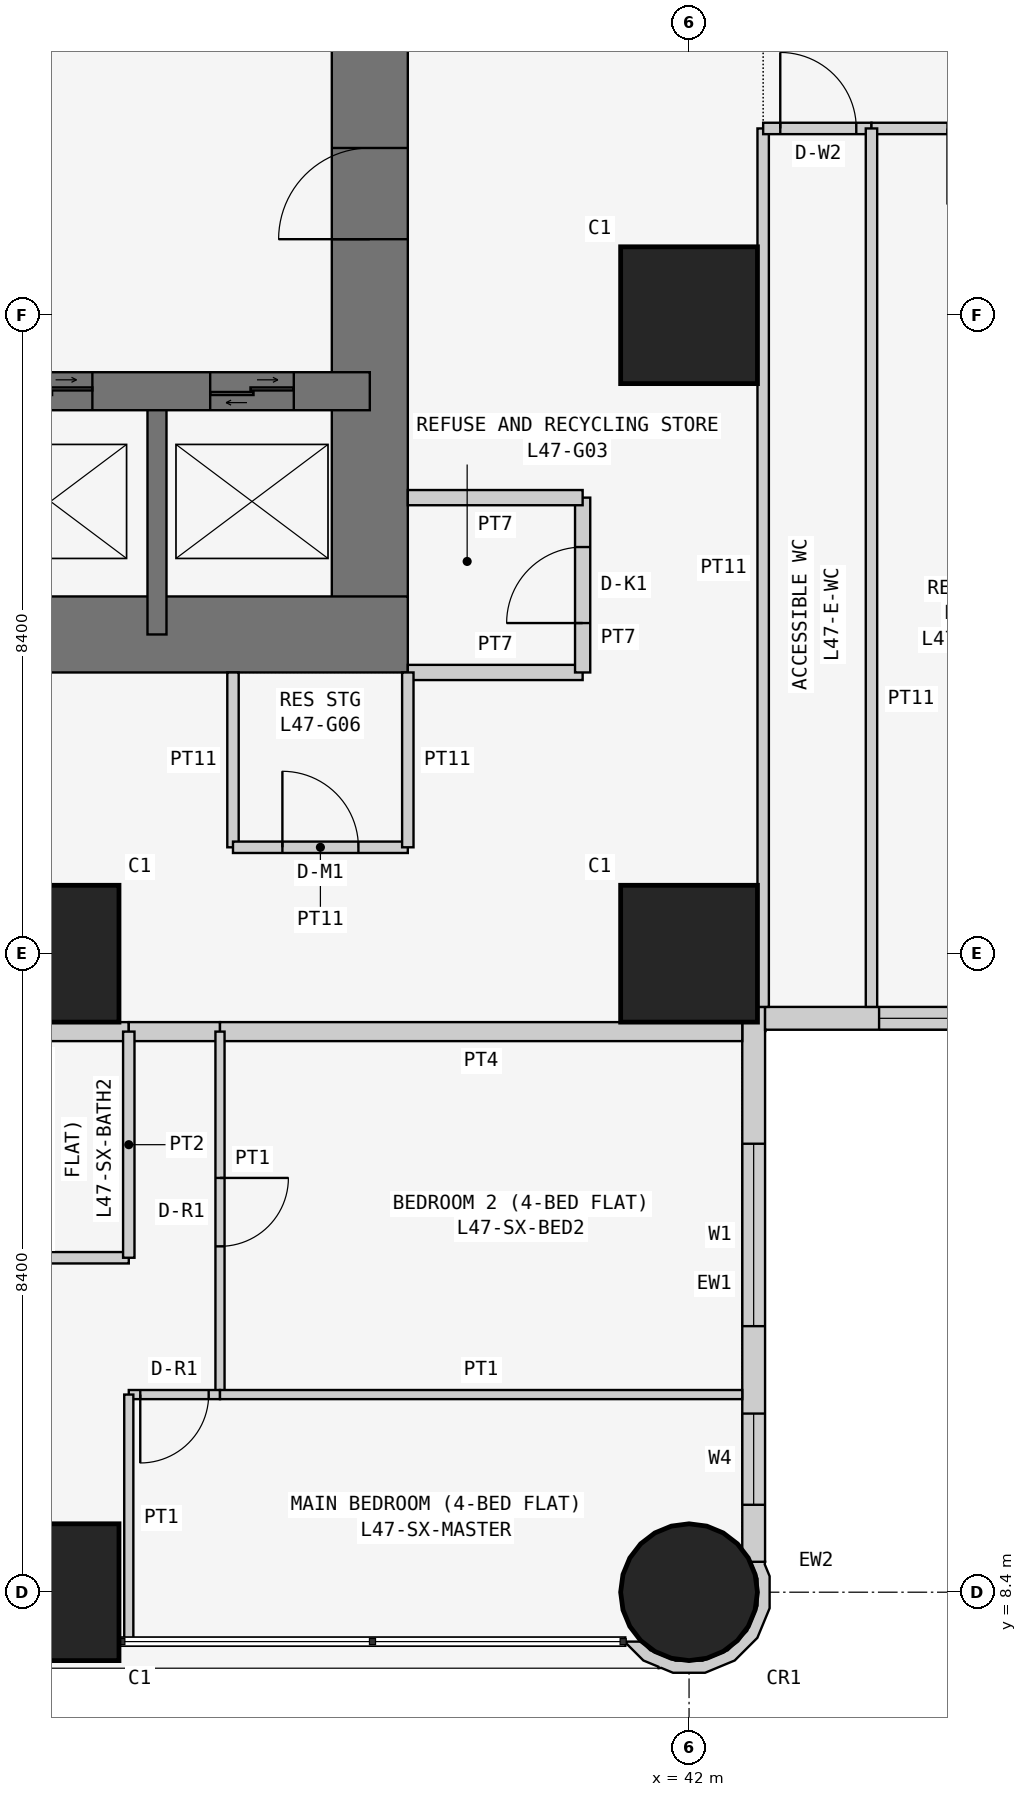
"""IFC4 building model, lengths in metres.
Left out: names, types, materials, properties, quantities, classifications, styles, units other than length and angle.
Written with IfcOpenShell. Run it as: python <this file> out.ifc"""

import sys

from ifc_helpers import new_model, si_unit, direction, frame, frame_2d, origin, origin_2d, place, context, subcontext, project, spatial, polyline, rectangle, circle, outline, extrude, element, fill, save


model = new_model("IFC4")
c1 = context("Model", 3, precision=1e-05, world=origin(), true_north=direction((0.0, 1.0)))
c2 = subcontext(c1, "Body", "Model", "MODEL_VIEW")
j1 = project(units=[si_unit("LENGTHUNIT", "METRE"), si_unit("PLANEANGLEUNIT", "RADIAN")], contexts=[c1])
p1 = place(None, origin())
s1 = spatial("IfcSite", under=j1, at=p1, CompositionType="ELEMENT")
p2 = place(p1, origin())
s2 = spatial("IfcBuilding", under=s1, at=p2, CompositionType="ELEMENT")
p3 = place(p2, frame((0.0, 0.0, 183.3)))
s3 = spatial("IfcBuildingStorey", under=s2, at=p3, CompositionType="ELEMENT", Elevation=183.3)
for number, where, z_axis, x_axis in (
    (1, (33.6, 8.4, 0.0), (0.0, 0.0, 1.0), (1.0, 0.0, 0.0)),
    (2, (33.6, 16.8, 0.0), (0.0, 0.0, 1.0), (1.0, 0.0, 0.0)),
):
    element("IfcColumn", number, at=place(p3, frame(where, z_axis=z_axis, x_axis=x_axis)), inside=s3, PredefinedType="COLUMN", context=c2, shape_type="SweptSolid", body=[
        extrude(rectangle(XDim=1.8, YDim=1.8, at=origin_2d()), origin(), (0.0, 0.0, 1.0), 3.6),
    ])
p4 = place(p3, frame((42.0, 8.4, 0.0), z_axis=(0.0, 0.0, 1.0), x_axis=(1.0, 0.0, 0.0)))
e3 = element("IfcColumn", 3, at=p4, inside=s3, PredefinedType="COLUMN", context=c2, shape_type="SweptSolid", body=[
    extrude(circle(Radius=0.9, at=origin_2d()), origin(), (0.0, 0.0, 1.0), 3.6),
])
for number, where, z_axis, x_axis in (
    (4, (42.0, 16.8, 0.0), (0.0, 0.0, 1.0), (1.0, 0.0, 0.0)),
    (5, (42.0, 25.2, 0.0), (0.0, 0.0, 1.0), (1.0, 0.0, 0.0)),
):
    element("IfcColumn", number, at=place(p3, frame(where, z_axis=z_axis, x_axis=x_axis)), inside=s3, PredefinedType="COLUMN", context=c2, shape_type="SweptSolid", body=[
        extrude(rectangle(XDim=1.8, YDim=1.8, at=origin_2d()), origin(), (0.0, 0.0, 1.0), 3.6),
    ])
p5 = place(p3, frame((21.0, 21.0, 0.0), z_axis=(0.0, 0.0, 1.0), x_axis=(1.0, 0.0, 0.0)))
e6 = element("IfcWall", 6, at=p5, inside=s3, PredefinedType="SHEAR", context=c2, shape_type="SweptSolid", body=[
    extrude(rectangle(XDim=17.3, YDim=1.0, at=frame_2d((8.65, 0.0))), origin(), (0.0, 0.0, 1.0), 3.6),
])
p6 = place(p3, frame((37.8, 21.0, 0.0), z_axis=(0.0, 0.0, 1.0), x_axis=(0.0, 1.0, 0.0)))
e7 = element("IfcWall", 7, at=p6, inside=s3, PredefinedType="SHEAR", context=c2, shape_type="SweptSolid", body=[
    extrude(rectangle(XDim=17.3, YDim=1.0, at=frame_2d((8.65, 0.0))), origin(), (0.0, 0.0, 1.0), 3.6),
])
p7 = place(p6, frame((5.2, 0.0, 0.0)))
e8 = element("IfcOpeningElement", 8, at=p7, cuts=e7, PredefinedType="OPENING", context=c2, shape_type="SweptSolid", body=[
    extrude(rectangle(XDim=1.2, YDim=2.1, at=frame_2d((0.6, 1.05))), frame((0.0, 0.51, 0.0), z_axis=(0.0, -1.0, 0.0), x_axis=(1.0, 0.0, 0.0)), (0.0, 0.0, 1.0), 1.02),
])
p8 = place(p3, frame((26.6, 24.2, 0.0), z_axis=(0.0, 0.0, 1.0), x_axis=(1.0, 0.0, 0.0)))
e9 = element("IfcWall", 9, at=p8, inside=s3, PredefinedType="SHEAR", context=c2, shape_type="SweptSolid", body=[
    extrude(rectangle(XDim=11.2, YDim=0.5, at=frame_2d((5.6, 0.0))), origin(), (0.0, 0.0, 1.0), 3.6),
])
p9 = place(p8, frame((0.962, 0.0, 0.0)))
e10 = element("IfcOpeningElement", 10, at=p9, cuts=e9, PredefinedType="OPENING", context=c2, shape_type="SweptSolid", body=[
    extrude(rectangle(XDim=1.0, YDim=2.1, at=frame_2d((0.5, 1.05))), frame((0.0, 0.26, 0.0), z_axis=(0.0, -1.0, 0.0), x_axis=(1.0, 0.0, 0.0)), (0.0, 0.0, 1.0), 0.52),
])
p10 = place(p8, frame((3.75, 0.0, 0.0)))
e11 = element("IfcOpeningElement", 11, at=p10, cuts=e9, PredefinedType="OPENING", context=c2, shape_type="SweptSolid", body=[
    extrude(rectangle(XDim=0.9, YDim=2.1, at=frame_2d((0.45, 1.05))), frame((0.0, 0.26, 0.0), z_axis=(0.0, -1.0, 0.0), x_axis=(1.0, 0.0, 0.0)), (0.0, 0.0, 1.0), 0.52),
])
p11 = place(p8, frame((6.45, 0.0, 0.0)))
e12 = element("IfcOpeningElement", 12, at=p11, cuts=e9, PredefinedType="OPENING", context=c2, shape_type="SweptSolid", body=[
    extrude(rectangle(XDim=1.1, YDim=2.1, at=frame_2d((0.55, 1.05))), frame((0.0, 0.26, 0.0), z_axis=(0.0, -1.0, 0.0), x_axis=(1.0, 0.0, 0.0)), (0.0, 0.0, 1.0), 0.52),
])
p12 = place(p8, frame((9.1, 0.0, 0.0)))
e13 = element("IfcOpeningElement", 13, at=p12, cuts=e9, PredefinedType="OPENING", context=c2, shape_type="SweptSolid", body=[
    extrude(rectangle(XDim=1.1, YDim=2.1, at=frame_2d((0.55, 1.05))), frame((0.0, 0.26, 0.0), z_axis=(0.0, -1.0, 0.0), x_axis=(1.0, 0.0, 0.0)), (0.0, 0.0, 1.0), 0.52),
])
p13 = place(p3, frame((35.0, 21.0, 0.0), z_axis=(0.0, 0.0, 1.0), x_axis=(0.0, 1.0, 0.0)))
e14 = element("IfcWall", 14, at=p13, inside=s3, PredefinedType="SHEAR", context=c2, shape_type="SweptSolid", body=[
    extrude(rectangle(XDim=3.2, YDim=0.25, at=frame_2d((1.6, 0.0))), origin(), (0.0, 0.0, 1.0), 3.6),
])
p14 = place(p3, frame((42.85, 8.8, 0.0), z_axis=(0.0, 0.0, 1.0), x_axis=(0.0, 1.0, 0.0)))
e15 = element("IfcWall", 15, at=p14, inside=s3, PredefinedType="SOLIDWALL", context=c2, shape_type="SweptSolid", body=[
    extrude(rectangle(XDim=7.3, YDim=0.3, at=frame_2d((3.65, 0.0))), origin(), (0.0, 0.0, 1.0), 3.45),
])
p15 = place(p14, frame((3.1, 0.0, 0.9)))
e16 = element("IfcOpeningElement", 16, at=p15, cuts=e15, PredefinedType="OPENING", context=c2, shape_type="SweptSolid", body=[
    extrude(rectangle(XDim=2.4, YDim=1.5, at=frame_2d((1.2, 0.75))), frame((0.0, 0.16, 0.0), z_axis=(0.0, -1.0, 0.0), x_axis=(1.0, 0.0, 0.0)), (0.0, 0.0, 1.0), 0.32),
])
p16 = place(p14, frame((0.75, 0.0, 0.9)))
e17 = element("IfcOpeningElement", 17, at=p16, cuts=e15, PredefinedType="OPENING", context=c2, shape_type="SweptSolid", body=[
    extrude(rectangle(XDim=1.2, YDim=1.5, at=frame_2d((0.6, 0.75))), frame((0.0, 0.16, 0.0), z_axis=(0.0, -1.0, 0.0), x_axis=(1.0, 0.0, 0.0)), (0.0, 0.0, 1.0), 0.32),
])
p17 = place(p3, frame((43.0, 15.95, 0.0), z_axis=(0.0, 0.0, 1.0), x_axis=(1.0, 0.0, 0.0)))
e18 = element("IfcWall", 18, at=p17, inside=s3, PredefinedType="SOLIDWALL", context=c2, shape_type="SweptSolid", body=[
    extrude(rectangle(XDim=7.0, YDim=0.3, at=frame_2d((3.5, 0.0))), origin(), (0.0, 0.0, 1.0), 3.45),
])
p18 = place(p17, frame((1.5, 0.0, 0.9)))
e19 = element("IfcOpeningElement", 19, at=p18, cuts=e18, PredefinedType="OPENING", context=c2, shape_type="SweptSolid", body=[
    extrude(rectangle(XDim=2.4, YDim=1.5, at=frame_2d((1.2, 0.75))), frame((0.0, 0.16, 0.0), z_axis=(0.0, -1.0, 0.0), x_axis=(1.0, 0.0, 0.0)), (0.0, 0.0, 1.0), 0.32),
])
p19 = place(p17, frame((5.05, 0.0, 0.9)))
e20 = element("IfcOpeningElement", 20, at=p19, cuts=e18, PredefinedType="OPENING", context=c2, shape_type="SweptSolid", body=[
    extrude(rectangle(XDim=1.2, YDim=1.5, at=frame_2d((0.6, 0.75))), frame((0.0, 0.16, 0.0), z_axis=(0.0, -1.0, 0.0), x_axis=(1.0, 0.0, 0.0)), (0.0, 0.0, 1.0), 0.32),
])
p20 = place(p3, frame((41.233, 7.789, 0.0), z_axis=(0.0, 0.0, 1.0), x_axis=(0.377204953059, -0.926129809145, 0.0)))
e21 = element("IfcWall", 21, at=p20, inside=s3, PredefinedType="SOLIDWALL", context=c2, shape_type="SweptSolid", body=[
    extrude(outline(polyline([(0.319, 1.842), (-0.072, 2.002), (-0.24, 2.001), (-0.27, 2.017), (-0.37, 1.841), (-0.102, 1.842), (0.23, 1.707), (0.485, 1.455), (0.624, 1.125), (0.626, 0.766), (0.491, 0.434), (0.239, 0.179), (0.09, 0.117), (0.011, -0.078), (0.025, -0.083), (0.329, 0.045), (0.48, 0.198), (0.499, 0.193), (0.508, 0.225), (0.626, 0.345), (0.785, 0.736), (0.782, 1.157), (0.619, 1.546), (0.319, 1.842)])), origin(), (0.0, 0.0, 1.0), 3.45),
])
p21 = place(p3, frame((38.3, 20.5, 0.0), z_axis=(0.0, 0.0, 1.0), x_axis=(1.0, 0.0, 0.0)))
e22 = element("IfcWall", 22, at=p21, inside=s3, PredefinedType="PARTITIONING", context=c2, shape_type="SweptSolid", body=[
    extrude(rectangle(XDim=2.3, YDim=0.2, at=frame_2d((1.15, 0.0))), origin(), (0.0, 0.0, 1.0), 3.45),
])
p22 = place(p3, frame((40.6, 20.5, 0.0), z_axis=(0.0, 0.0, 1.0), x_axis=(0.0, 1.0, 0.0)))
e23 = element("IfcWall", 23, at=p22, inside=s3, PredefinedType="PARTITIONING", context=c2, shape_type="SweptSolid", body=[
    extrude(rectangle(XDim=2.3, YDim=0.2, at=frame_2d((1.15, 0.0))), origin(), (0.0, 0.0, 1.0), 3.45),
])
p23 = place(p22, frame((0.65, 0.0, 0.0)))
e24 = element("IfcOpeningElement", 24, at=p23, cuts=e23, PredefinedType="OPENING", context=c2, shape_type="SweptSolid", body=[
    extrude(rectangle(XDim=1.0, YDim=2.1, at=frame_2d((0.5, 1.05))), frame((0.0, 0.11, 0.0), z_axis=(0.0, -1.0, 0.0), x_axis=(1.0, 0.0, 0.0)), (0.0, 0.0, 1.0), 0.22),
])
p24 = place(p3, frame((40.6, 22.8, 0.0), z_axis=(0.0, 0.0, 1.0), x_axis=(-1.0, 0.0, 0.0)))
e25 = element("IfcWall", 25, at=p24, inside=s3, PredefinedType="PARTITIONING", context=c2, shape_type="SweptSolid", body=[
    extrude(rectangle(XDim=2.3, YDim=0.2, at=frame_2d((1.15, 0.0))), origin(), (0.0, 0.0, 1.0), 3.45),
])
p25 = place(p3, frame((36.0, 20.5, 0.0), z_axis=(0.0, 0.0, 1.0), x_axis=(0.0, -1.0, 0.0)))
e26 = element("IfcWall", 26, at=p25, inside=s3, PredefinedType="PARTITIONING", context=c2, shape_type="SweptSolid", body=[
    extrude(rectangle(XDim=2.3, YDim=0.15, at=frame_2d((1.15, 0.0))), origin(), (0.0, 0.0, 1.0), 3.45),
])
p26 = place(p3, frame((36.0, 18.2, 0.0), z_axis=(0.0, 0.0, 1.0), x_axis=(1.0, 0.0, 0.0)))
e27 = element("IfcWall", 27, at=p26, inside=s3, PredefinedType="PARTITIONING", context=c2, shape_type="SweptSolid", body=[
    extrude(rectangle(XDim=2.3, YDim=0.15, at=frame_2d((1.15, 0.0))), origin(), (0.0, 0.0, 1.0), 3.45),
])
p27 = place(p26, frame((0.65, 0.0, 0.0)))
e28 = element("IfcOpeningElement", 28, at=p27, cuts=e27, PredefinedType="OPENING", context=c2, shape_type="SweptSolid", body=[
    extrude(rectangle(XDim=1.0, YDim=2.1, at=frame_2d((0.5, 1.05))), frame((0.0, 0.085, 0.0), z_axis=(0.0, -1.0, 0.0), x_axis=(1.0, 0.0, 0.0)), (0.0, 0.0, 1.0), 0.17),
])
p28 = place(p3, frame((38.3, 18.2, 0.0), z_axis=(0.0, 0.0, 1.0), x_axis=(0.0, 1.0, 0.0)))
e29 = element("IfcWall", 29, at=p28, inside=s3, PredefinedType="PARTITIONING", context=c2, shape_type="SweptSolid", body=[
    extrude(rectangle(XDim=2.3, YDim=0.15, at=frame_2d((1.15, 0.0))), origin(), (0.0, 0.0, 1.0), 3.45),
])
p29 = place(p3, frame((42.975, 27.657, 0.0), z_axis=(0.0, 0.0, 1.0), x_axis=(0.0, -1.0, 0.0)))
e30 = element("IfcWall", 30, at=p29, inside=s3, PredefinedType="PARTITIONING", context=c2, shape_type="SweptSolid", body=[
    extrude(rectangle(XDim=11.557, YDim=0.15, at=frame_2d((5.778, 0.0))), origin(), (0.0, 0.0, 1.0), 3.45),
])
p30 = place(p3, frame((34.629, 15.775, 0.0), z_axis=(0.0, 0.0, 1.0), x_axis=(-1.0, 0.0, 0.0)))
e31 = element("IfcWall", 31, at=p30, inside=s3, PredefinedType="PARTITIONING", context=c2, shape_type="SweptSolid", body=[
    extrude(rectangle(XDim=2.629, YDim=0.25, at=frame_2d((1.314, 0.0))), origin(), (0.0, 0.0, 1.0), 3.45),
])
p31 = place(p3, frame((35.829, 15.775, 0.0), z_axis=(0.0, 0.0, 1.0), x_axis=(-1.0, 0.0, 0.0)))
e32 = element("IfcWall", 32, at=p31, inside=s3, PredefinedType="PARTITIONING", context=c2, shape_type="SweptSolid", body=[
    extrude(rectangle(XDim=1.2, YDim=0.25, at=frame_2d((0.6, 0.0))), origin(), (0.0, 0.0, 1.0), 3.45),
])
p32 = place(p3, frame((42.7, 15.775, 0.0), z_axis=(0.0, 0.0, 1.0), x_axis=(-1.0, 0.0, 0.0)))
e33 = element("IfcWall", 33, at=p32, inside=s3, PredefinedType="PARTITIONING", context=c2, shape_type="SweptSolid", body=[
    extrude(rectangle(XDim=6.871, YDim=0.25, at=frame_2d((3.436, 0.0))), origin(), (0.0, 0.0, 1.0), 3.45),
])
p33 = place(p3, frame((42.975, 27.657, 0.0), z_axis=(0.0, 0.0, 1.0), x_axis=(1.0, 0.0, 0.0)))
e34 = element("IfcWall", 34, at=p33, inside=s3, PredefinedType="PARTITIONING", context=c2, shape_type="SweptSolid", body=[
    extrude(rectangle(XDim=1.425, YDim=0.15, at=frame_2d((0.712, 0.0))), origin(), (0.0, 0.0, 1.0), 3.45),
])
p34 = place(p33, frame((0.225, 0.0, 0.0)))
e35 = element("IfcOpeningElement", 35, at=p34, cuts=e34, PredefinedType="OPENING", context=c2, shape_type="SweptSolid", body=[
    extrude(rectangle(XDim=1.0, YDim=2.1, at=frame_2d((0.5, 1.05))), frame((0.0, 0.085, 0.0), z_axis=(0.0, -1.0, 0.0), x_axis=(1.0, 0.0, 0.0)), (0.0, 0.0, 1.0), 0.17),
])
p35 = place(p3, frame((44.4, 27.657, 0.0), z_axis=(0.0, 0.0, 1.0), x_axis=(1.0, 0.0, 0.0)))
e36 = element("IfcWall", 36, at=p35, inside=s3, PredefinedType="PARTITIONING", context=c2, shape_type="SweptSolid", body=[
    extrude(rectangle(XDim=3.0, YDim=0.15, at=frame_2d((1.5, 0.0))), origin(), (0.0, 0.0, 1.0), 3.45),
])
p36 = place(p35, frame((1.0, 0.0, 0.0)))
e37 = element("IfcOpeningElement", 37, at=p36, cuts=e36, PredefinedType="OPENING", context=c2, shape_type="SweptSolid", body=[
    extrude(rectangle(XDim=1.0, YDim=2.1, at=frame_2d((0.5, 1.05))), frame((0.0, 0.085, 0.0), z_axis=(0.0, -1.0, 0.0), x_axis=(1.0, 0.0, 0.0)), (0.0, 0.0, 1.0), 0.17),
])
p37 = place(p3, frame((44.4, 16.1, 0.0), z_axis=(0.0, 0.0, 1.0), x_axis=(0.0, 1.0, 0.0)))
e38 = element("IfcWall", 38, at=p37, inside=s3, PredefinedType="PARTITIONING", context=c2, shape_type="SweptSolid", body=[
    extrude(rectangle(XDim=11.557, YDim=0.15, at=frame_2d((5.778, 0.0))), origin(), (0.0, 0.0, 1.0), 3.45),
])
p38 = place(p3, frame((32.0, 12.8, 0.0), z_axis=(0.0, 0.0, 1.0), x_axis=(1.0, 0.0, 0.0)))
e39 = element("IfcWall", 39, at=p38, inside=s3, PredefinedType="PARTITIONING", context=c2, shape_type="SweptSolid", body=[
    extrude(rectangle(XDim=2.629, YDim=0.15, at=frame_2d((1.314, 0.0))), origin(), (0.0, 0.0, 1.0), 3.45),
])
p39 = place(p3, frame((34.629, 12.8, 0.0), z_axis=(0.0, 0.0, 1.0), x_axis=(0.0, 1.0, 0.0)))
e40 = element("IfcWall", 40, at=p39, inside=s3, PredefinedType="PARTITIONING", context=c2, shape_type="SweptSolid", body=[
    extrude(rectangle(XDim=2.975, YDim=0.15, at=frame_2d((1.487, 0.0))), origin(), (0.0, 0.0, 1.0), 3.45),
])
p40 = place(p3, frame((35.829, 15.775, 0.0), z_axis=(0.0, 0.0, 1.0), x_axis=(0.0, -1.0, 0.0)))
e41 = element("IfcWall", 41, at=p40, inside=s3, PredefinedType="PARTITIONING", context=c2, shape_type="SweptSolid", body=[
    extrude(rectangle(XDim=4.775, YDim=0.12, at=frame_2d((2.387, 0.0))), origin(), (0.0, 0.0, 1.0), 3.45),
])
p41 = place(p40, frame((1.925, 0.0, 0.0)))
e42 = element("IfcOpeningElement", 42, at=p41, cuts=e41, PredefinedType="OPENING", context=c2, shape_type="SweptSolid", body=[
    extrude(rectangle(XDim=0.9, YDim=2.1, at=frame_2d((0.45, 1.05))), frame((0.0, 0.07, 0.0), z_axis=(0.0, -1.0, 0.0), x_axis=(1.0, 0.0, 0.0)), (0.0, 0.0, 1.0), 0.14),
])
p42 = place(p3, frame((35.829, 11.0, 0.0), z_axis=(0.0, 0.0, 1.0), x_axis=(-1.0, 0.0, 0.0)))
e43 = element("IfcWall", 43, at=p42, inside=s3, PredefinedType="PARTITIONING", context=c2, shape_type="SweptSolid", body=[
    extrude(rectangle(XDim=1.2, YDim=0.12, at=frame_2d((0.6, 0.0))), origin(), (0.0, 0.0, 1.0), 3.45),
])
p43 = place(p42, frame((0.149, 0.0, 0.0)))
e44 = element("IfcOpeningElement", 44, at=p43, cuts=e43, PredefinedType="OPENING", context=c2, shape_type="SweptSolid", body=[
    extrude(rectangle(XDim=0.9, YDim=2.1, at=frame_2d((0.45, 1.05))), frame((0.0, 0.07, 0.0), z_axis=(0.0, -1.0, 0.0), x_axis=(1.0, 0.0, 0.0)), (0.0, 0.0, 1.0), 0.14),
])
p44 = place(p3, frame((34.629, 11.0, 0.0), z_axis=(0.0, 0.0, 1.0), x_axis=(0.0, -1.0, 0.0)))
e45 = element("IfcWall", 45, at=p44, inside=s3, PredefinedType="PARTITIONING", context=c2, shape_type="SweptSolid", body=[
    extrude(rectangle(XDim=3.25, YDim=0.12, at=frame_2d((1.625, 0.0))), origin(), (0.0, 0.0, 1.0), 3.45),
])
p45 = place(p3, frame((35.829, 11.0, 0.0), z_axis=(0.0, 0.0, 1.0), x_axis=(1.0, 0.0, 0.0)))
e46 = element("IfcWall", 46, at=p45, inside=s3, PredefinedType="PARTITIONING", context=c2, shape_type="SweptSolid", body=[
    extrude(rectangle(XDim=6.871, YDim=0.12, at=frame_2d((3.436, 0.0))), origin(), (0.0, 0.0, 1.0), 3.45),
])
p46 = place(p18, origin())
e47 = element("IfcWindow", 47, at=p46, inside=s3, PartitioningType="SINGLE_PANEL", PredefinedType="WINDOW", context=c2, shape_type="SweptSolid", body=[
    extrude(rectangle(XDim=2.4, YDim=1.5, at=frame_2d((1.2, 0.75))), frame((0.0, 0.03, 0.0), z_axis=(0.0, -1.0, 0.0), x_axis=(1.0, 0.0, 0.0)), (0.0, 0.0, 1.0), 0.06),
])
fill(e19, e47)
p47 = place(p15, origin())
e48 = element("IfcWindow", 48, at=p47, inside=s3, PartitioningType="SINGLE_PANEL", PredefinedType="WINDOW", context=c2, shape_type="SweptSolid", body=[
    extrude(rectangle(XDim=2.4, YDim=1.5, at=frame_2d((1.2, 0.75))), frame((0.0, 0.03, 0.0), z_axis=(0.0, -1.0, 0.0), x_axis=(1.0, 0.0, 0.0)), (0.0, 0.0, 1.0), 0.06),
])
fill(e16, e48)
p48 = place(p16, origin())
e49 = element("IfcWindow", 49, at=p48, inside=s3, PartitioningType="SINGLE_PANEL", PredefinedType="WINDOW", context=c2, shape_type="SweptSolid", body=[
    extrude(rectangle(XDim=1.2, YDim=1.5, at=frame_2d((0.6, 0.75))), frame((0.0, 0.03, 0.0), z_axis=(0.0, -1.0, 0.0), x_axis=(1.0, 0.0, 0.0)), (0.0, 0.0, 1.0), 0.06),
])
fill(e17, e49)
p49 = place(p23, origin())
e50 = element("IfcDoor", 50, at=p49, inside=s3, OperationType="SINGLE_SWING_LEFT", PredefinedType="DOOR", context=c2, shape_type="SweptSolid", body=[
    extrude(rectangle(XDim=1.0, YDim=2.1, at=frame_2d((0.5, 1.05))), frame((0.0, 0.025, 0.0), z_axis=(0.0, -1.0, 0.0), x_axis=(1.0, 0.0, 0.0)), (0.0, 0.0, 1.0), 0.05),
])
fill(e24, e50)
p50 = place(p27, origin())
e51 = element("IfcDoor", 51, at=p50, inside=s3, OperationType="SINGLE_SWING_LEFT", PredefinedType="DOOR", context=c2, shape_type="SweptSolid", body=[
    extrude(rectangle(XDim=1.0, YDim=2.1, at=frame_2d((0.5, 1.05))), frame((0.0, 0.025, 0.0), z_axis=(0.0, -1.0, 0.0), x_axis=(1.0, 0.0, 0.0)), (0.0, 0.0, 1.0), 0.05),
])
fill(e28, e51)
p51 = place(p34, origin())
e52 = element("IfcDoor", 52, at=p51, inside=s3, OperationType="SINGLE_SWING_LEFT", PredefinedType="DOOR", context=c2, shape_type="SweptSolid", body=[
    extrude(rectangle(XDim=1.0, YDim=2.1, at=frame_2d((0.5, 1.05))), frame((0.0, 0.025, 0.0), z_axis=(0.0, -1.0, 0.0), x_axis=(1.0, 0.0, 0.0)), (0.0, 0.0, 1.0), 0.05),
])
fill(e35, e52)
p52 = place(p41, origin())
e53 = element("IfcDoor", 53, at=p52, inside=s3, OperationType="SINGLE_SWING_LEFT", PredefinedType="DOOR", context=c2, shape_type="SweptSolid", body=[
    extrude(rectangle(XDim=0.9, YDim=2.1, at=frame_2d((0.45, 1.05))), frame((0.0, 0.025, 0.0), z_axis=(0.0, -1.0, 0.0), x_axis=(1.0, 0.0, 0.0)), (0.0, 0.0, 1.0), 0.05),
])
fill(e42, e53)
p53 = place(p43, origin())
e54 = element("IfcDoor", 54, at=p53, inside=s3, OperationType="SINGLE_SWING_RIGHT", PredefinedType="DOOR", context=c2, shape_type="SweptSolid", body=[
    extrude(rectangle(XDim=0.9, YDim=2.1, at=frame_2d((0.45, 1.05))), frame((0.0, 0.025, 0.0), z_axis=(0.0, -1.0, 0.0), x_axis=(1.0, 0.0, 0.0)), (0.0, 0.0, 1.0), 0.05),
])
fill(e44, e54)
p54 = place(p7, origin())
e55 = element("IfcDoor", 55, at=p54, inside=s3, OperationType="SINGLE_SWING_LEFT", PredefinedType="DOOR", context=c2, shape_type="SweptSolid", body=[
    extrude(rectangle(XDim=1.2, YDim=2.1, at=frame_2d((0.6, 1.05))), frame((0.0, 0.025, 0.0), z_axis=(0.0, -1.0, 0.0), x_axis=(1.0, 0.0, 0.0)), (0.0, 0.0, 1.0), 0.05),
])
fill(e8, e55)
p55 = place(p11, origin())
e56 = element("IfcDoor", 56, at=p55, inside=s3, OperationType="DOUBLE_DOOR_SLIDING", PredefinedType="DOOR", context=c2, shape_type="SweptSolid", body=[
    extrude(rectangle(XDim=1.1, YDim=2.1, at=frame_2d((0.55, 1.05))), frame((0.0, 0.025, 0.0), z_axis=(0.0, -1.0, 0.0), x_axis=(1.0, 0.0, 0.0)), (0.0, 0.0, 1.0), 0.05),
])
fill(e12, e56)
p56 = place(p12, origin())
e57 = element("IfcDoor", 57, at=p56, inside=s3, OperationType="DOUBLE_DOOR_SLIDING", PredefinedType="DOOR", context=c2, shape_type="SweptSolid", body=[
    extrude(rectangle(XDim=1.1, YDim=2.1, at=frame_2d((0.55, 1.05))), frame((0.0, 0.025, 0.0), z_axis=(0.0, -1.0, 0.0), x_axis=(1.0, 0.0, 0.0)), (0.0, 0.0, 1.0), 0.05),
])
fill(e13, e57)
save(model, sys.argv[1])
